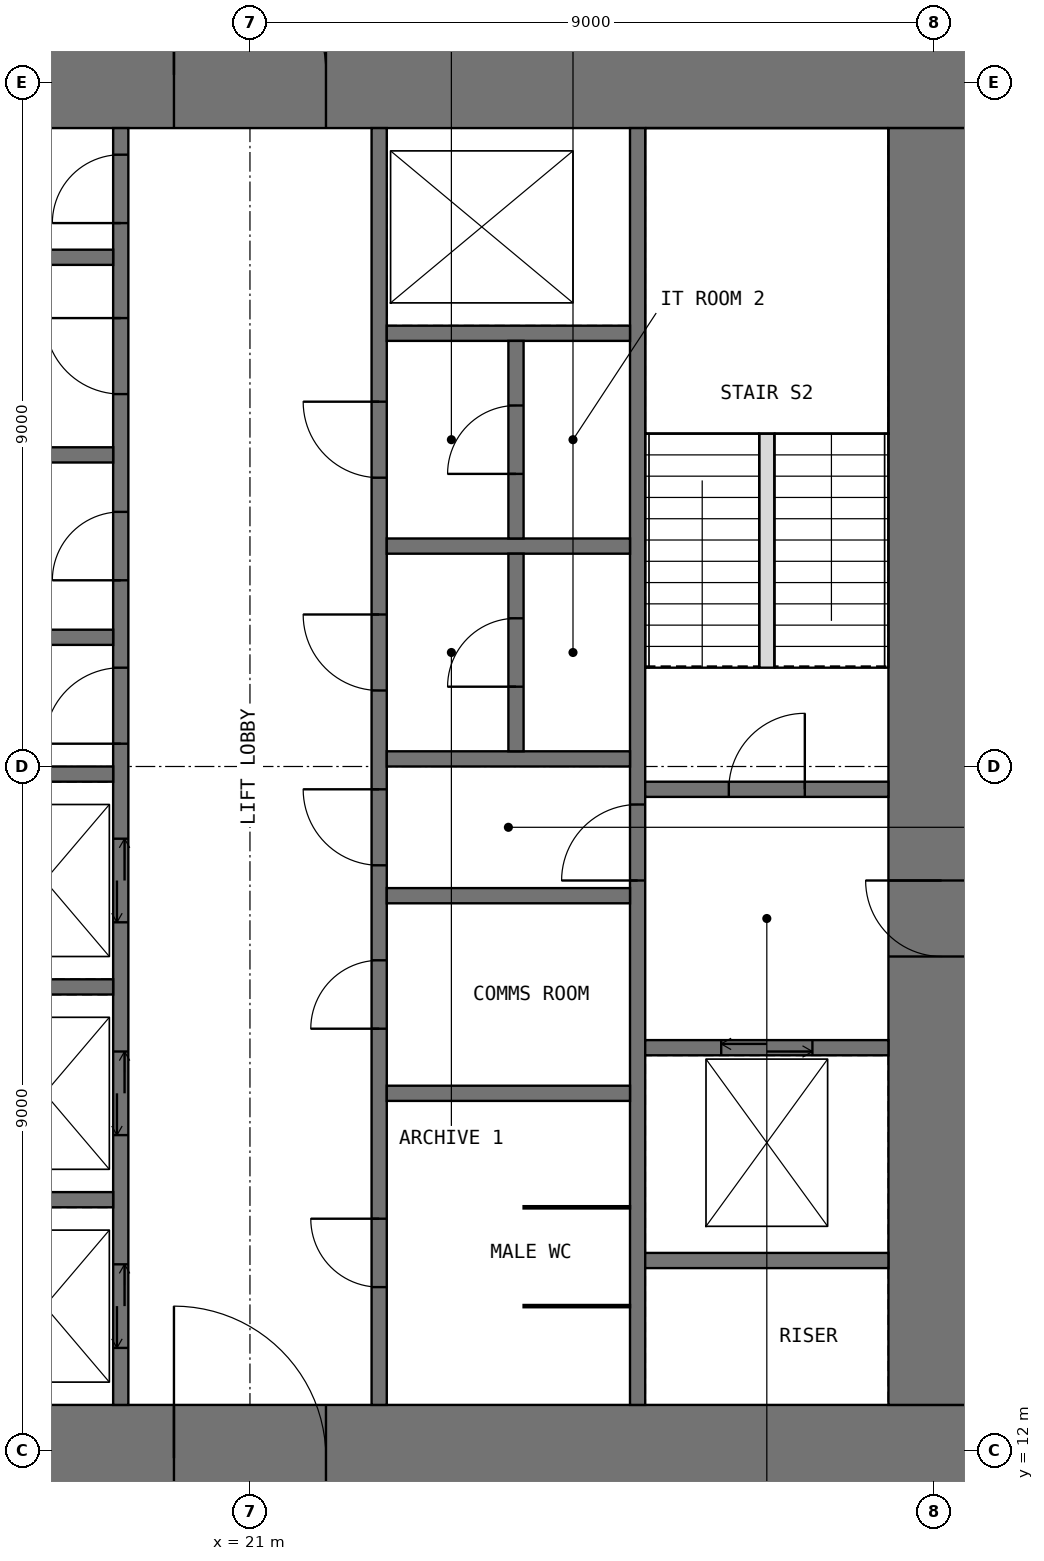
"""IFC4 building model, lengths in metres.
Left out: names, types, materials, properties, quantities, classifications, styles, units other than length and angle.
Written with IfcOpenShell. Run it as: python <this file> out.ifc"""

import sys

from ifc_helpers import new_model, si_unit, direction, frame, frame_2d, origin, place, context, subcontext, project, spatial, rectangle, extrude, element, fill, save


model = new_model("IFC4")
c1 = context("Model", 3, precision=1e-05, world=origin(), true_north=direction((0.0, 1.0)))
c2 = subcontext(c1, "Body", "Model", "MODEL_VIEW")
j1 = project(units=[si_unit("LENGTHUNIT", "METRE"), si_unit("PLANEANGLEUNIT", "RADIAN")], contexts=[c1])
p1 = place(None, origin())
s1 = spatial("IfcSite", under=j1, at=p1, CompositionType="ELEMENT")
p2 = place(p1, origin())
s2 = spatial("IfcBuilding", under=s1, at=p2, CompositionType="ELEMENT")
p3 = place(p2, frame((0.0, 0.0, 214.5)))
s3 = spatial("IfcBuildingStorey", under=s2, at=p3, CompositionType="ELEMENT", Elevation=214.5)
p4 = place(p3, frame((11.2, 11.9, -0.05), z_axis=(0.0, 0.0, 1.0), x_axis=(1.0, 0.0, 0.0)))
e1 = element("IfcWall", 1, at=p4, inside=s3, PredefinedType="SHEAR", context=c2, shape_type="SweptSolid", body=[
    extrude(rectangle(XDim=19.6, YDim=1.4, at=frame_2d((9.8, 0.0))), origin(), (0.0, 0.0, 1.0), 4.0),
])
p5 = place(p4, frame((8.8, 0.0, 0.05)))
e2 = element("IfcOpeningElement", 2, at=p5, cuts=e1, PredefinedType="OPENING", context=c2, shape_type="SweptSolid", body=[
    extrude(rectangle(XDim=2.0, YDim=2.2, at=frame_2d((1.0, 1.1))), frame((0.0, 0.71, 0.0), z_axis=(0.0, -1.0, 0.0), x_axis=(1.0, 0.0, 0.0)), (0.0, 0.0, 1.0), 1.42),
])
p6 = place(p3, frame((11.2, 30.1, -0.05), z_axis=(0.0, 0.0, 1.0), x_axis=(1.0, 0.0, 0.0)))
e3 = element("IfcWall", 3, at=p6, inside=s3, PredefinedType="SHEAR", context=c2, shape_type="SweptSolid", body=[
    extrude(rectangle(XDim=19.6, YDim=1.4, at=frame_2d((9.8, 0.0))), origin(), (0.0, 0.0, 1.0), 4.0),
])
p7 = place(p6, frame((8.8, 0.0, 0.05)))
e4 = element("IfcOpeningElement", 4, at=p7, cuts=e3, PredefinedType="OPENING", context=c2, shape_type="SweptSolid", body=[
    extrude(rectangle(XDim=2.0, YDim=2.2, at=frame_2d((1.0, 1.1))), frame((0.0, 0.71, 0.0), z_axis=(0.0, -1.0, 0.0), x_axis=(1.0, 0.0, 0.0)), (0.0, 0.0, 1.0), 1.42),
])
p8 = place(p3, frame((30.1, 12.6, -0.05), z_axis=(0.0, 0.0, 1.0), x_axis=(0.0, 1.0, 0.0)))
e5 = element("IfcWall", 5, at=p8, inside=s3, PredefinedType="SHEAR", context=c2, shape_type="SweptSolid", body=[
    extrude(rectangle(XDim=16.8, YDim=1.4, at=frame_2d((8.4, 0.0))), origin(), (0.0, 0.0, 1.0), 4.0),
])
p9 = place(p8, frame((5.9, 0.0, 0.05)))
e6 = element("IfcOpeningElement", 6, at=p9, cuts=e5, PredefinedType="OPENING", context=c2, shape_type="SweptSolid", body=[
    extrude(rectangle(XDim=1.0, YDim=2.2, at=frame_2d((0.5, 1.1))), frame((0.0, 0.71, 0.0), z_axis=(0.0, -1.0, 0.0), x_axis=(1.0, 0.0, 0.0)), (0.0, 0.0, 1.0), 1.42),
])
p10 = place(p3, frame((19.3, 12.6, -0.05), z_axis=(0.0, 0.0, 1.0), x_axis=(0.0, 1.0, 0.0)))
e7 = element("IfcWall", 7, at=p10, inside=s3, PredefinedType="SHEAR", context=c2, shape_type="SweptSolid", body=[
    extrude(rectangle(XDim=16.8, YDim=0.2, at=frame_2d((8.4, 0.0))), origin(), (0.0, 0.0, 1.0), 4.0),
])
p11 = place(p10, frame((8.7, 0.0, 0.05)))
e8 = element("IfcOpeningElement", 8, at=p11, cuts=e7, PredefinedType="OPENING", context=c2, shape_type="SweptSolid", body=[
    extrude(rectangle(XDim=1.0, YDim=2.2, at=frame_2d((0.5, 1.1))), frame((0.0, 0.11, 0.0), z_axis=(0.0, -1.0, 0.0), x_axis=(1.0, 0.0, 0.0)), (0.0, 0.0, 1.0), 0.22),
])
p12 = place(p10, frame((10.85, 0.0, 0.05)))
e9 = element("IfcOpeningElement", 9, at=p12, cuts=e7, PredefinedType="OPENING", context=c2, shape_type="SweptSolid", body=[
    extrude(rectangle(XDim=0.9, YDim=2.2, at=frame_2d((0.45, 1.1))), frame((0.0, 0.11, 0.0), z_axis=(0.0, -1.0, 0.0), x_axis=(1.0, 0.0, 0.0)), (0.0, 0.0, 1.0), 0.22),
])
p13 = place(p10, frame((13.3, 0.0, 0.05)))
e10 = element("IfcOpeningElement", 10, at=p13, cuts=e7, PredefinedType="OPENING", context=c2, shape_type="SweptSolid", body=[
    extrude(rectangle(XDim=1.0, YDim=2.2, at=frame_2d((0.5, 1.1))), frame((0.0, 0.11, 0.0), z_axis=(0.0, -1.0, 0.0), x_axis=(1.0, 0.0, 0.0)), (0.0, 0.0, 1.0), 0.22),
])
p14 = place(p10, frame((15.55, 0.0, 0.05)))
e11 = element("IfcOpeningElement", 11, at=p14, cuts=e7, PredefinedType="OPENING", context=c2, shape_type="SweptSolid", body=[
    extrude(rectangle(XDim=0.9, YDim=2.2, at=frame_2d((0.45, 1.1))), frame((0.0, 0.11, 0.0), z_axis=(0.0, -1.0, 0.0), x_axis=(1.0, 0.0, 0.0)), (0.0, 0.0, 1.0), 0.22),
])
p15 = place(p10, frame((0.75, 0.0, 0.05)))
e12 = element("IfcOpeningElement", 12, at=p15, cuts=e7, PredefinedType="OPENING", context=c2, shape_type="SweptSolid", body=[
    extrude(rectangle(XDim=1.1, YDim=2.2, at=frame_2d((0.55, 1.1))), frame((0.0, 0.11, 0.0), z_axis=(0.0, -1.0, 0.0), x_axis=(1.0, 0.0, 0.0)), (0.0, 0.0, 1.0), 0.22),
])
p16 = place(p10, frame((3.55, 0.0, 0.05)))
e13 = element("IfcOpeningElement", 13, at=p16, cuts=e7, PredefinedType="OPENING", context=c2, shape_type="SweptSolid", body=[
    extrude(rectangle(XDim=1.1, YDim=2.2, at=frame_2d((0.55, 1.1))), frame((0.0, 0.11, 0.0), z_axis=(0.0, -1.0, 0.0), x_axis=(1.0, 0.0, 0.0)), (0.0, 0.0, 1.0), 0.22),
])
p17 = place(p10, frame((6.35, 0.0, 0.05)))
e14 = element("IfcOpeningElement", 14, at=p17, cuts=e7, PredefinedType="OPENING", context=c2, shape_type="SweptSolid", body=[
    extrude(rectangle(XDim=1.1, YDim=2.2, at=frame_2d((0.55, 1.1))), frame((0.0, 0.11, 0.0), z_axis=(0.0, -1.0, 0.0), x_axis=(1.0, 0.0, 0.0)), (0.0, 0.0, 1.0), 0.22),
])
p18 = place(p3, frame((22.7, 12.6, -0.05), z_axis=(0.0, 0.0, 1.0), x_axis=(0.0, 1.0, 0.0)))
e15 = element("IfcWall", 15, at=p18, inside=s3, PredefinedType="SHEAR", context=c2, shape_type="SweptSolid", body=[
    extrude(rectangle(XDim=16.8, YDim=0.2, at=frame_2d((8.4, 0.0))), origin(), (0.0, 0.0, 1.0), 4.0),
])
p19 = place(p18, frame((7.1, 0.0, 0.05)))
e16 = element("IfcOpeningElement", 16, at=p19, cuts=e15, PredefinedType="OPENING", context=c2, shape_type="SweptSolid", body=[
    extrude(rectangle(XDim=1.0, YDim=2.2, at=frame_2d((0.5, 1.1))), frame((0.0, 0.11, 0.0), z_axis=(0.0, -1.0, 0.0), x_axis=(1.0, 0.0, 0.0)), (0.0, 0.0, 1.0), 0.22),
])
p20 = place(p18, frame((1.55, 0.0, 0.05)))
e17 = element("IfcOpeningElement", 17, at=p20, cuts=e15, PredefinedType="OPENING", context=c2, shape_type="SweptSolid", body=[
    extrude(rectangle(XDim=0.9, YDim=2.2, at=frame_2d((0.45, 1.1))), frame((0.0, 0.11, 0.0), z_axis=(0.0, -1.0, 0.0), x_axis=(1.0, 0.0, 0.0)), (0.0, 0.0, 1.0), 0.22),
])
p21 = place(p18, frame((4.95, 0.0, 0.05)))
e18 = element("IfcOpeningElement", 18, at=p21, cuts=e15, PredefinedType="OPENING", context=c2, shape_type="SweptSolid", body=[
    extrude(rectangle(XDim=0.9, YDim=2.2, at=frame_2d((0.45, 1.1))), frame((0.0, 0.11, 0.0), z_axis=(0.0, -1.0, 0.0), x_axis=(1.0, 0.0, 0.0)), (0.0, 0.0, 1.0), 0.22),
])
p22 = place(p18, frame((9.4, 0.0, 0.05)))
e19 = element("IfcOpeningElement", 19, at=p22, cuts=e15, PredefinedType="OPENING", context=c2, shape_type="SweptSolid", body=[
    extrude(rectangle(XDim=1.0, YDim=2.2, at=frame_2d((0.5, 1.1))), frame((0.0, 0.11, 0.0), z_axis=(0.0, -1.0, 0.0), x_axis=(1.0, 0.0, 0.0)), (0.0, 0.0, 1.0), 0.22),
])
p23 = place(p18, frame((12.2, 0.0, 0.05)))
e20 = element("IfcOpeningElement", 20, at=p23, cuts=e15, PredefinedType="OPENING", context=c2, shape_type="SweptSolid", body=[
    extrude(rectangle(XDim=1.0, YDim=2.2, at=frame_2d((0.5, 1.1))), frame((0.0, 0.11, 0.0), z_axis=(0.0, -1.0, 0.0), x_axis=(1.0, 0.0, 0.0)), (0.0, 0.0, 1.0), 0.22),
])
p24 = place(p3, frame((26.1, 12.6, -0.05), z_axis=(0.0, 0.0, 1.0), x_axis=(0.0, 1.0, 0.0)))
e21 = element("IfcWall", 21, at=p24, inside=s3, PredefinedType="SHEAR", context=c2, shape_type="SweptSolid", body=[
    extrude(rectangle(XDim=16.8, YDim=0.2, at=frame_2d((8.4, 0.0))), origin(), (0.0, 0.0, 1.0), 4.0),
])
p25 = place(p24, frame((6.9, 0.0, 0.05)))
e22 = element("IfcOpeningElement", 22, at=p25, cuts=e21, PredefinedType="OPENING", context=c2, shape_type="SweptSolid", body=[
    extrude(rectangle(XDim=1.0, YDim=2.2, at=frame_2d((0.5, 1.1))), frame((0.0, 0.11, 0.0), z_axis=(0.0, -1.0, 0.0), x_axis=(1.0, 0.0, 0.0)), (0.0, 0.0, 1.0), 0.22),
])
for number, where, z_axis, x_axis in (
    (23, (16.0, 15.3, -0.05), (0.0, 0.0, 1.0), (1.0, 0.0, 0.0)),
    (24, (16.0, 18.1, -0.05), (0.0, 0.0, 1.0), (1.0, 0.0, 0.0)),
    (25, (16.0, 20.9, -0.05), (0.0, 0.0, 1.0), (1.0, 0.0, 0.0)),
    (26, (16.0, 22.7, -0.05), (0.0, 0.0, 1.0), (1.0, 0.0, 0.0)),
    (27, (16.0, 25.1, -0.05), (0.0, 0.0, 1.0), (1.0, 0.0, 0.0)),
    (28, (16.0, 27.7, -0.05), (0.0, 0.0, 1.0), (1.0, 0.0, 0.0)),
    (29, (22.8, 16.7, -0.05), (0.0, 0.0, 1.0), (1.0, 0.0, 0.0)),
    (30, (22.8, 19.3, -0.05), (0.0, 0.0, 1.0), (1.0, 0.0, 0.0)),
    (31, (22.8, 21.1, -0.05), (0.0, 0.0, 1.0), (1.0, 0.0, 0.0)),
    (32, (22.8, 23.9, -0.05), (0.0, 0.0, 1.0), (1.0, 0.0, 0.0)),
    (33, (22.8, 26.7, -0.05), (0.0, 0.0, 1.0), (1.0, 0.0, 0.0)),
    (34, (26.2, 14.5, -0.05), (0.0, 0.0, 1.0), (1.0, 0.0, 0.0)),
):
    element("IfcWall", number, at=place(p3, frame(where, z_axis=z_axis, x_axis=x_axis)), inside=s3, PredefinedType="SHEAR", context=c2, shape_type="SweptSolid", body=[
        extrude(rectangle(XDim=3.2, YDim=0.2, at=frame_2d((1.6, 0.0))), origin(), (0.0, 0.0, 1.0), 4.0),
    ])
p26 = place(p3, frame((26.2, 17.3, -0.05), z_axis=(0.0, 0.0, 1.0), x_axis=(1.0, 0.0, 0.0)))
e35 = element("IfcWall", 35, at=p26, inside=s3, PredefinedType="SHEAR", context=c2, shape_type="SweptSolid", body=[
    extrude(rectangle(XDim=3.2, YDim=0.2, at=frame_2d((1.6, 0.0))), origin(), (0.0, 0.0, 1.0), 4.0),
])
p27 = place(p26, frame((1.0, 0.0, 0.05)))
e36 = element("IfcOpeningElement", 36, at=p27, cuts=e35, PredefinedType="OPENING", context=c2, shape_type="SweptSolid", body=[
    extrude(rectangle(XDim=1.2, YDim=2.2, at=frame_2d((0.6, 1.1))), frame((0.0, 0.11, 0.0), z_axis=(0.0, -1.0, 0.0), x_axis=(1.0, 0.0, 0.0)), (0.0, 0.0, 1.0), 0.22),
])
p28 = place(p3, frame((26.2, 20.7, -0.05), z_axis=(0.0, 0.0, 1.0), x_axis=(1.0, 0.0, 0.0)))
e37 = element("IfcWall", 37, at=p28, inside=s3, PredefinedType="SHEAR", context=c2, shape_type="SweptSolid", body=[
    extrude(rectangle(XDim=3.2, YDim=0.2, at=frame_2d((1.6, 0.0))), origin(), (0.0, 0.0, 1.0), 4.0),
])
p29 = place(p28, frame((1.1, 0.0, 0.05)))
e38 = element("IfcOpeningElement", 38, at=p29, cuts=e37, PredefinedType="OPENING", context=c2, shape_type="SweptSolid", body=[
    extrude(rectangle(XDim=1.0, YDim=2.2, at=frame_2d((0.5, 1.1))), frame((0.0, 0.11, 0.0), z_axis=(0.0, -1.0, 0.0), x_axis=(1.0, 0.0, 0.0)), (0.0, 0.0, 1.0), 0.22),
])
for number, where, z_axis, x_axis in (
    (39, (24.6, 13.9, 0.0), (0.0, 0.0, 1.0), (1.0, 0.0, 0.0)),
    (40, (24.6, 15.2, 0.0), (0.0, 0.0, 1.0), (1.0, 0.0, 0.0)),
):
    element("IfcWall", number, at=place(p3, frame(where, z_axis=z_axis, x_axis=x_axis)), inside=s3, PredefinedType="PARTITIONING", context=c2, shape_type="SweptSolid", body=[
        extrude(rectangle(XDim=1.4, YDim=0.03, at=frame_2d((0.7, 0.0))), origin(), (0.0, 0.0, 1.0), 3.75),
    ])
p30 = place(p3, frame((24.5, 21.2, -0.05), z_axis=(0.0, 0.0, 1.0), x_axis=(0.0, 1.0, 0.0)))
e41 = element("IfcWall", 41, at=p30, inside=s3, PredefinedType="SHEAR", context=c2, shape_type="SweptSolid", body=[
    extrude(rectangle(XDim=2.6, YDim=0.2, at=frame_2d((1.3, 0.0))), origin(), (0.0, 0.0, 1.0), 4.0),
])
p31 = place(p30, frame((0.85, 0.0, 0.05)))
e42 = element("IfcOpeningElement", 42, at=p31, cuts=e41, PredefinedType="OPENING", context=c2, shape_type="SweptSolid", body=[
    extrude(rectangle(XDim=0.9, YDim=2.2, at=frame_2d((0.45, 1.1))), frame((0.0, 0.11, 0.0), z_axis=(0.0, -1.0, 0.0), x_axis=(1.0, 0.0, 0.0)), (0.0, 0.0, 1.0), 0.22),
])
p32 = place(p3, frame((24.5, 24.0, -0.05), z_axis=(0.0, 0.0, 1.0), x_axis=(0.0, 1.0, 0.0)))
e43 = element("IfcWall", 43, at=p32, inside=s3, PredefinedType="SHEAR", context=c2, shape_type="SweptSolid", body=[
    extrude(rectangle(XDim=2.6, YDim=0.2, at=frame_2d((1.3, 0.0))), origin(), (0.0, 0.0, 1.0), 4.0),
])
p33 = place(p32, frame((0.85, 0.0, 0.05)))
e44 = element("IfcOpeningElement", 44, at=p33, cuts=e43, PredefinedType="OPENING", context=c2, shape_type="SweptSolid", body=[
    extrude(rectangle(XDim=0.9, YDim=2.2, at=frame_2d((0.45, 1.1))), frame((0.0, 0.11, 0.0), z_axis=(0.0, -1.0, 0.0), x_axis=(1.0, 0.0, 0.0)), (0.0, 0.0, 1.0), 0.22),
])
p34 = place(p3, frame((27.8, 22.3, 0.0), z_axis=(0.0, 0.0, 1.0), x_axis=(0.0, 1.0, 0.0)))
e45 = element("IfcWall", 45, at=p34, inside=s3, PredefinedType="PARTITIONING", context=c2, shape_type="SweptSolid", body=[
    extrude(rectangle(XDim=3.08, YDim=0.2, at=frame_2d((1.54, 0.0))), origin(), (0.0, 0.0, 1.0), 4.0),
])
p35 = place(p5, origin())
e46 = element("IfcDoor", 46, at=p35, inside=s3, OperationType="DOUBLE_DOOR_SINGLE_SWING", PredefinedType="DOOR", context=c2, shape_type="SweptSolid", body=[
    extrude(rectangle(XDim=2.0, YDim=2.2, at=frame_2d((1.0, 1.1))), frame((0.0, 0.025, 0.0), z_axis=(0.0, -1.0, 0.0), x_axis=(1.0, 0.0, 0.0)), (0.0, 0.0, 1.0), 0.05),
])
fill(e2, e46)
p36 = place(p7, origin())
e47 = element("IfcDoor", 47, at=p36, inside=s3, OperationType="DOUBLE_DOOR_SINGLE_SWING", PredefinedType="DOOR", context=c2, shape_type="SweptSolid", body=[
    extrude(rectangle(XDim=2.0, YDim=2.2, at=frame_2d((1.0, 1.1))), frame((0.0, 0.025, 0.0), z_axis=(0.0, -1.0, 0.0), x_axis=(1.0, 0.0, 0.0)), (0.0, 0.0, 1.0), 0.05),
])
fill(e4, e47)
p37 = place(p9, origin())
e48 = element("IfcDoor", 48, at=p37, inside=s3, OperationType="SINGLE_SWING_RIGHT", PredefinedType="DOOR", context=c2, shape_type="SweptSolid", body=[
    extrude(rectangle(XDim=1.0, YDim=2.2, at=frame_2d((0.5, 1.1))), frame((0.0, 0.025, 0.0), z_axis=(0.0, -1.0, 0.0), x_axis=(1.0, 0.0, 0.0)), (0.0, 0.0, 1.0), 0.05),
])
fill(e6, e48)
p38 = place(p29, origin())
e49 = element("IfcDoor", 49, at=p38, inside=s3, OperationType="SINGLE_SWING_RIGHT", PredefinedType="DOOR", context=c2, shape_type="SweptSolid", body=[
    extrude(rectangle(XDim=1.0, YDim=2.2, at=frame_2d((0.5, 1.1))), frame((0.0, 0.025, 0.0), z_axis=(0.0, -1.0, 0.0), x_axis=(1.0, 0.0, 0.0)), (0.0, 0.0, 1.0), 0.05),
])
fill(e38, e49)
p39 = place(p25, origin())
e50 = element("IfcDoor", 50, at=p39, inside=s3, OperationType="SINGLE_SWING_LEFT", PredefinedType="DOOR", context=c2, shape_type="SweptSolid", body=[
    extrude(rectangle(XDim=1.0, YDim=2.2, at=frame_2d((0.5, 1.1))), frame((0.0, 0.025, 0.0), z_axis=(0.0, -1.0, 0.0), x_axis=(1.0, 0.0, 0.0)), (0.0, 0.0, 1.0), 0.05),
])
fill(e22, e50)
p40 = place(p11, origin())
e51 = element("IfcDoor", 51, at=p40, inside=s3, OperationType="SINGLE_SWING_LEFT", PredefinedType="DOOR", context=c2, shape_type="SweptSolid", body=[
    extrude(rectangle(XDim=1.0, YDim=2.2, at=frame_2d((0.5, 1.1))), frame((0.0, 0.025, 0.0), z_axis=(0.0, -1.0, 0.0), x_axis=(1.0, 0.0, 0.0)), (0.0, 0.0, 1.0), 0.05),
])
fill(e8, e51)
p41 = place(p19, origin())
e52 = element("IfcDoor", 52, at=p41, inside=s3, OperationType="SINGLE_SWING_RIGHT", PredefinedType="DOOR", context=c2, shape_type="SweptSolid", body=[
    extrude(rectangle(XDim=1.0, YDim=2.2, at=frame_2d((0.5, 1.1))), frame((0.0, 0.025, 0.0), z_axis=(0.0, -1.0, 0.0), x_axis=(1.0, 0.0, 0.0)), (0.0, 0.0, 1.0), 0.05),
])
fill(e16, e52)
p42 = place(p12, origin())
e53 = element("IfcDoor", 53, at=p42, inside=s3, OperationType="SINGLE_SWING_LEFT", PredefinedType="DOOR", context=c2, shape_type="SweptSolid", body=[
    extrude(rectangle(XDim=0.9, YDim=2.2, at=frame_2d((0.45, 1.1))), frame((0.0, 0.025, 0.0), z_axis=(0.0, -1.0, 0.0), x_axis=(1.0, 0.0, 0.0)), (0.0, 0.0, 1.0), 0.05),
])
fill(e9, e53)
p43 = place(p13, origin())
e54 = element("IfcDoor", 54, at=p43, inside=s3, OperationType="SINGLE_SWING_RIGHT", PredefinedType="DOOR", context=c2, shape_type="SweptSolid", body=[
    extrude(rectangle(XDim=1.0, YDim=2.2, at=frame_2d((0.5, 1.1))), frame((0.0, 0.025, 0.0), z_axis=(0.0, -1.0, 0.0), x_axis=(1.0, 0.0, 0.0)), (0.0, 0.0, 1.0), 0.05),
])
fill(e10, e54)
p44 = place(p14, origin())
e55 = element("IfcDoor", 55, at=p44, inside=s3, OperationType="SINGLE_SWING_LEFT", PredefinedType="DOOR", context=c2, shape_type="SweptSolid", body=[
    extrude(rectangle(XDim=0.9, YDim=2.2, at=frame_2d((0.45, 1.1))), frame((0.0, 0.025, 0.0), z_axis=(0.0, -1.0, 0.0), x_axis=(1.0, 0.0, 0.0)), (0.0, 0.0, 1.0), 0.05),
])
fill(e11, e55)
p45 = place(p20, origin())
e56 = element("IfcDoor", 56, at=p45, inside=s3, OperationType="SINGLE_SWING_RIGHT", PredefinedType="DOOR", context=c2, shape_type="SweptSolid", body=[
    extrude(rectangle(XDim=0.9, YDim=2.2, at=frame_2d((0.45, 1.1))), frame((0.0, 0.025, 0.0), z_axis=(0.0, -1.0, 0.0), x_axis=(1.0, 0.0, 0.0)), (0.0, 0.0, 1.0), 0.05),
])
fill(e17, e56)
p46 = place(p21, origin())
e57 = element("IfcDoor", 57, at=p46, inside=s3, OperationType="SINGLE_SWING_LEFT", PredefinedType="DOOR", context=c2, shape_type="SweptSolid", body=[
    extrude(rectangle(XDim=0.9, YDim=2.2, at=frame_2d((0.45, 1.1))), frame((0.0, 0.025, 0.0), z_axis=(0.0, -1.0, 0.0), x_axis=(1.0, 0.0, 0.0)), (0.0, 0.0, 1.0), 0.05),
])
fill(e18, e57)
p47 = place(p22, origin())
e58 = element("IfcDoor", 58, at=p47, inside=s3, OperationType="SINGLE_SWING_RIGHT", PredefinedType="DOOR", context=c2, shape_type="SweptSolid", body=[
    extrude(rectangle(XDim=1.0, YDim=2.2, at=frame_2d((0.5, 1.1))), frame((0.0, 0.025, 0.0), z_axis=(0.0, -1.0, 0.0), x_axis=(1.0, 0.0, 0.0)), (0.0, 0.0, 1.0), 0.05),
])
fill(e19, e58)
p48 = place(p31, origin())
e59 = element("IfcDoor", 59, at=p48, inside=s3, OperationType="SINGLE_SWING_LEFT", PredefinedType="DOOR", context=c2, shape_type="SweptSolid", body=[
    extrude(rectangle(XDim=0.9, YDim=2.2, at=frame_2d((0.45, 1.1))), frame((0.0, 0.025, 0.0), z_axis=(0.0, -1.0, 0.0), x_axis=(1.0, 0.0, 0.0)), (0.0, 0.0, 1.0), 0.05),
])
fill(e42, e59)
p49 = place(p23, origin())
e60 = element("IfcDoor", 60, at=p49, inside=s3, OperationType="SINGLE_SWING_RIGHT", PredefinedType="DOOR", context=c2, shape_type="SweptSolid", body=[
    extrude(rectangle(XDim=1.0, YDim=2.2, at=frame_2d((0.5, 1.1))), frame((0.0, 0.025, 0.0), z_axis=(0.0, -1.0, 0.0), x_axis=(1.0, 0.0, 0.0)), (0.0, 0.0, 1.0), 0.05),
])
fill(e20, e60)
p50 = place(p33, origin())
e61 = element("IfcDoor", 61, at=p50, inside=s3, OperationType="SINGLE_SWING_LEFT", PredefinedType="DOOR", context=c2, shape_type="SweptSolid", body=[
    extrude(rectangle(XDim=0.9, YDim=2.2, at=frame_2d((0.45, 1.1))), frame((0.0, 0.025, 0.0), z_axis=(0.0, -1.0, 0.0), x_axis=(1.0, 0.0, 0.0)), (0.0, 0.0, 1.0), 0.05),
])
fill(e44, e61)
p51 = place(p15, origin())
e62 = element("IfcDoor", 62, at=p51, inside=s3, OperationType="DOUBLE_DOOR_SLIDING", PredefinedType="DOOR", context=c2, shape_type="SweptSolid", body=[
    extrude(rectangle(XDim=1.1, YDim=2.2, at=frame_2d((0.55, 1.1))), frame((0.0, 0.025, 0.0), z_axis=(0.0, -1.0, 0.0), x_axis=(1.0, 0.0, 0.0)), (0.0, 0.0, 1.0), 0.05),
])
fill(e12, e62)
p52 = place(p16, origin())
e63 = element("IfcDoor", 63, at=p52, inside=s3, OperationType="DOUBLE_DOOR_SLIDING", PredefinedType="DOOR", context=c2, shape_type="SweptSolid", body=[
    extrude(rectangle(XDim=1.1, YDim=2.2, at=frame_2d((0.55, 1.1))), frame((0.0, 0.025, 0.0), z_axis=(0.0, -1.0, 0.0), x_axis=(1.0, 0.0, 0.0)), (0.0, 0.0, 1.0), 0.05),
])
fill(e13, e63)
p53 = place(p17, origin())
e64 = element("IfcDoor", 64, at=p53, inside=s3, OperationType="DOUBLE_DOOR_SLIDING", PredefinedType="DOOR", context=c2, shape_type="SweptSolid", body=[
    extrude(rectangle(XDim=1.1, YDim=2.2, at=frame_2d((0.55, 1.1))), frame((0.0, 0.025, 0.0), z_axis=(0.0, -1.0, 0.0), x_axis=(1.0, 0.0, 0.0)), (0.0, 0.0, 1.0), 0.05),
])
fill(e14, e64)
p54 = place(p27, origin())
e65 = element("IfcDoor", 65, at=p54, inside=s3, OperationType="DOUBLE_DOOR_SLIDING", PredefinedType="DOOR", context=c2, shape_type="SweptSolid", body=[
    extrude(rectangle(XDim=1.2, YDim=2.2, at=frame_2d((0.6, 1.1))), frame((0.0, 0.025, 0.0), z_axis=(0.0, -1.0, 0.0), x_axis=(1.0, 0.0, 0.0)), (0.0, 0.0, 1.0), 0.05),
])
fill(e36, e65)
save(model, sys.argv[1])
